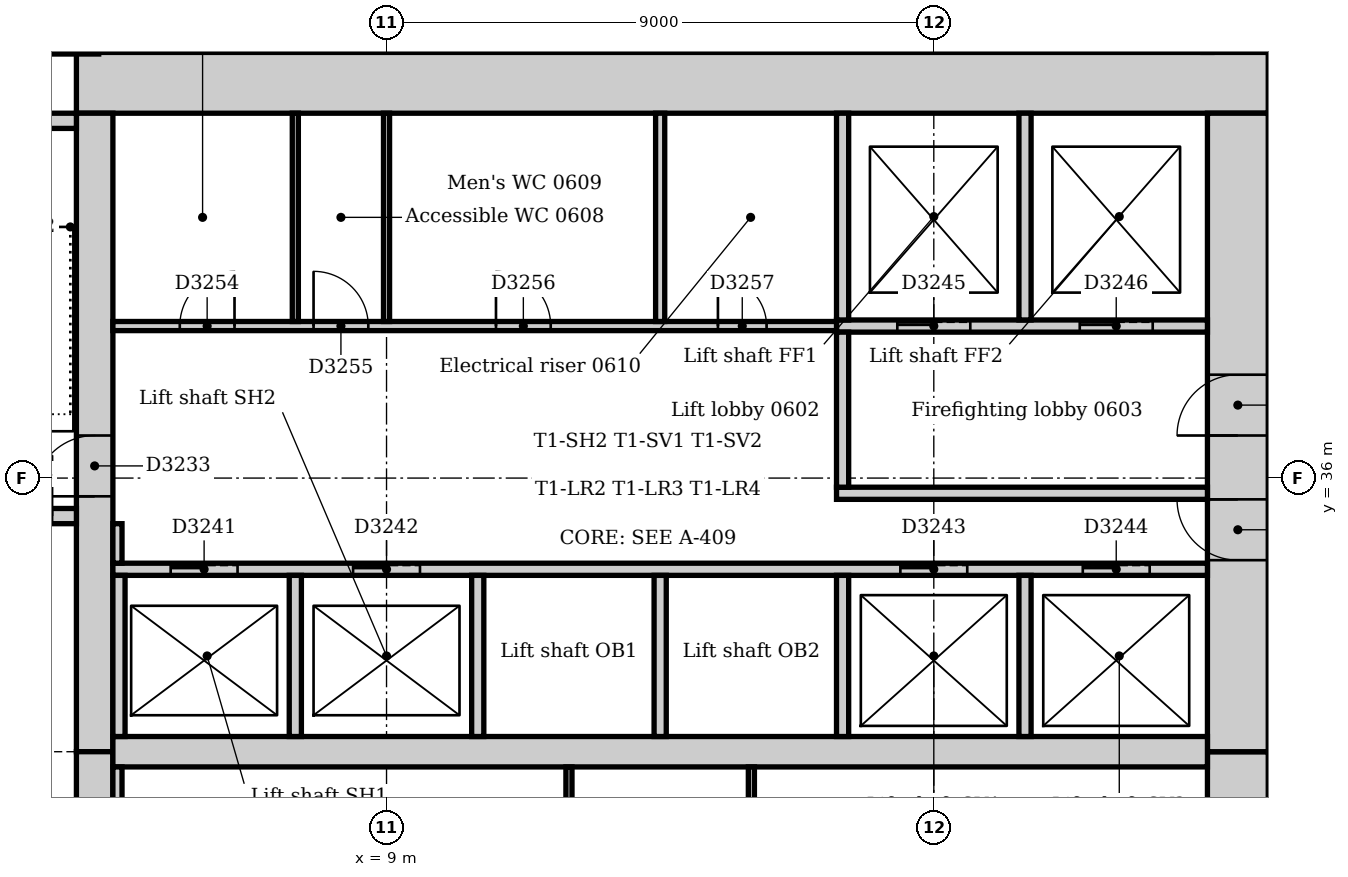
"""IFC4 building model, lengths in metres.
Left out: names, types, materials, properties, quantities, classifications, styles, units other than length and angle.
Written with IfcOpenShell. Run it as: python <this file> out.ifc"""

import sys

from ifc_helpers import new_model, si_unit, direction, frame, frame_2d, origin, origin_2d, place, context, subcontext, project, spatial, rectangle, extrude, element, fill, save


model = new_model("IFC4")
c1 = context("Model", 3, precision=1e-05, world=origin(), true_north=direction((0.0, 1.0)))
c2 = subcontext(c1, "Body", "Model", "MODEL_VIEW")
j1 = project(units=[si_unit("LENGTHUNIT", "METRE"), si_unit("PLANEANGLEUNIT", "RADIAN")], contexts=[c1])
p1 = place(None, origin())
s1 = spatial("IfcSite", under=j1, at=p1, CompositionType="ELEMENT")
p2 = place(p1, origin())
s2 = spatial("IfcBuilding", under=s1, at=p2, CompositionType="ELEMENT")
p3 = place(p2, frame((0.0, 0.0, 30.0)))
s3 = spatial("IfcBuildingStorey", under=s2, at=p3, CompositionType="ELEMENT", Elevation=30.0)
p4 = place(p3, frame((23.5, 42.5, 0.0), z_axis=(0.0, 0.0, 1.0), x_axis=(-1.0, 0.0, 0.0)))
e1 = element("IfcWall", 1, at=p4, inside=s3, PredefinedType="SOLIDWALL", context=c2, shape_type="SweptSolid", body=[
    extrude(rectangle(XDim=19.6, YDim=1.0, at=frame_2d((9.8, 0.0))), origin(), (0.0, 0.0, 1.0), 4.0),
])
p5 = place(p3, frame((23.0, 21.0, 0.0), z_axis=(0.0, 0.0, 1.0), x_axis=(0.0, 1.0, 0.0)))
e2 = element("IfcWall", 2, at=p5, inside=s3, PredefinedType="SOLIDWALL", context=c2, shape_type="SweptSolid", body=[
    extrude(rectangle(XDim=10.5, YDim=1.0, at=frame_2d((5.25, 0.0))), origin(), (0.0, 0.0, 1.0), 4.0),
])
p6 = place(p5, frame((4.35, 0.0, 0.0)))
e3 = element("IfcOpeningElement", 3, at=p6, cuts=e2, PredefinedType="OPENING", context=c2, shape_type="SweptSolid", body=[
    extrude(rectangle(XDim=1.8, YDim=2.1, at=frame_2d((0.9, 1.05))), frame((0.0, 0.51, 0.0), z_axis=(0.0, -1.0, 0.0), x_axis=(1.0, 0.0, 0.0)), (0.0, 0.0, 1.0), 1.02),
])
p7 = place(p3, frame((23.0, 31.5, 0.0), z_axis=(0.0, 0.0, 1.0), x_axis=(0.0, 1.0, 0.0)))
e4 = element("IfcWall", 4, at=p7, inside=s3, PredefinedType="SOLIDWALL", context=c2, shape_type="SweptSolid", body=[
    extrude(rectangle(XDim=10.5, YDim=1.0, at=frame_2d((5.25, 0.0))), origin(), (0.0, 0.0, 1.0), 4.0),
])
p8 = place(p7, frame((3.15, 0.0, 0.0)))
e5 = element("IfcOpeningElement", 5, at=p8, cuts=e4, PredefinedType="OPENING", context=c2, shape_type="SweptSolid", body=[
    extrude(rectangle(XDim=1.0, YDim=2.1, at=frame_2d((0.5, 1.05))), frame((0.0, 0.51, 0.0), z_axis=(0.0, -1.0, 0.0), x_axis=(1.0, 0.0, 0.0)), (0.0, 0.0, 1.0), 1.02),
])
p9 = place(p7, frame((5.2, 0.0, 0.0)))
e6 = element("IfcOpeningElement", 6, at=p9, cuts=e4, PredefinedType="OPENING", context=c2, shape_type="SweptSolid", body=[
    extrude(rectangle(XDim=1.0, YDim=2.1, at=frame_2d((0.5, 1.05))), frame((0.0, 0.51, 0.0), z_axis=(0.0, -1.0, 0.0), x_axis=(1.0, 0.0, 0.0)), (0.0, 0.0, 1.0), 1.02),
])
p10 = place(p3, frame((4.2, 42.0, 0.0), z_axis=(0.0, 0.0, 1.0), x_axis=(0.0, -1.0, 0.0)))
e7 = element("IfcWall", 7, at=p10, inside=s3, PredefinedType="SOLIDWALL", context=c2, shape_type="SweptSolid", body=[
    extrude(rectangle(XDim=10.5, YDim=0.6, at=frame_2d((5.25, 0.0))), origin(), (0.0, 0.0, 1.0), 4.0),
])
p11 = place(p10, frame((5.3, 0.0, 0.0)))
e8 = element("IfcOpeningElement", 8, at=p11, cuts=e7, PredefinedType="OPENING", context=c2, shape_type="SweptSolid", body=[
    extrude(rectangle(XDim=1.0, YDim=2.1, at=frame_2d((0.5, 1.05))), frame((0.0, 0.31, 0.0), z_axis=(0.0, -1.0, 0.0), x_axis=(1.0, 0.0, 0.0)), (0.0, 0.0, 1.0), 0.62),
])
p12 = place(p3, frame((4.2, 31.5, 0.0), z_axis=(0.0, 0.0, 1.0), x_axis=(0.0, -1.0, 0.0)))
e9 = element("IfcWall", 9, at=p12, inside=s3, PredefinedType="SOLIDWALL", context=c2, shape_type="SweptSolid", body=[
    extrude(rectangle(XDim=10.5, YDim=0.6, at=frame_2d((5.25, 0.0))), origin(), (0.0, 0.0, 1.0), 4.0),
])
p13 = place(p12, frame((4.25, 0.0, 0.0)))
e10 = element("IfcOpeningElement", 10, at=p13, cuts=e9, PredefinedType="OPENING", context=c2, shape_type="SweptSolid", body=[
    extrude(rectangle(XDim=1.0, YDim=2.1, at=frame_2d((0.5, 1.05))), frame((0.0, 0.31, 0.0), z_axis=(0.0, -1.0, 0.0), x_axis=(1.0, 0.0, 0.0)), (0.0, 0.0, 1.0), 0.62),
])
p14 = place(p3, frame((4.5, 31.5, 0.0), z_axis=(0.0, 0.0, 1.0), x_axis=(1.0, 0.0, 0.0)))
e11 = element("IfcWall", 11, at=p14, inside=s3, PredefinedType="SOLIDWALL", context=c2, shape_type="SweptSolid", body=[
    extrude(rectangle(XDim=18.0, YDim=0.5, at=frame_2d((9.0, 0.0))), origin(), (0.0, 0.0, 1.0), 4.0),
])
p15 = place(p3, frame((0.36, 35.375, 0.0), z_axis=(0.0, 0.0, 1.0), x_axis=(1.0, 0.0, 0.0)))
e12 = element("IfcWall", 12, at=p15, inside=s3, PredefinedType="SOLIDWALL", context=c2, shape_type="SweptSolid", body=[
    extrude(rectangle(XDim=3.54, YDim=0.25, at=frame_2d((1.77, 0.0))), origin(), (0.0, 0.0, 1.0), 4.0),
])
p16 = place(p15, frame((2.14, 0.0, 0.0)))
e13 = element("IfcOpeningElement", 13, at=p16, cuts=e12, PredefinedType="OPENING", context=c2, shape_type="SweptSolid", body=[
    extrude(rectangle(XDim=1.0, YDim=2.1, at=frame_2d((0.5, 1.05))), frame((0.0, 0.135, 0.0), z_axis=(0.0, -1.0, 0.0), x_axis=(1.0, 0.0, 0.0)), (0.0, 0.0, 1.0), 0.27),
])
p17 = place(p3, frame((3.9, 41.875, 0.0), z_axis=(0.0, 0.0, 1.0), x_axis=(-1.0, 0.0, 0.0)))
e14 = element("IfcWall", 14, at=p17, inside=s3, PredefinedType="SOLIDWALL", context=c2, shape_type="SweptSolid", body=[
    extrude(rectangle(XDim=3.54, YDim=0.25, at=frame_2d((1.77, 0.0))), origin(), (0.0, 0.0, 1.0), 4.0),
])
p18 = place(p3, frame((3.667, 43.574, 0.0), z_axis=(0.0, 0.0, 1.0), x_axis=(1.0, 0.0, 0.0)))
e15 = element("IfcColumn", 15, at=p18, inside=s3, PredefinedType="COLUMN", context=c2, shape_type="SweptSolid", body=[
    extrude(rectangle(XDim=1.2, YDim=1.2, at=origin_2d()), origin(), (0.0, 0.0, 1.0), 3.85),
])
p19 = place(p3, frame((16.4, 35.75, 0.0), z_axis=(0.0, 0.0, 1.0), x_axis=(1.0, 0.0, 0.0)))
e16 = element("IfcWall", 16, at=p19, inside=s3, PredefinedType="PARTITIONING", context=c2, shape_type="SweptSolid", body=[
    extrude(rectangle(XDim=6.1, YDim=0.2, at=frame_2d((3.05, 0.0))), origin(), (0.0, 0.0, 1.0), 3.85),
])
p20 = place(p3, frame((16.4, 38.5, 0.0), z_axis=(0.0, 0.0, 1.0), x_axis=(1.0, 0.0, 0.0)))
e17 = element("IfcWall", 17, at=p20, inside=s3, PredefinedType="PARTITIONING", context=c2, shape_type="SweptSolid", body=[
    extrude(rectangle(XDim=6.1, YDim=0.2, at=frame_2d((3.05, 0.0))), origin(), (0.0, 0.0, 1.0), 3.85),
])
p21 = place(p20, frame((1.0, 0.0, 0.0)))
e18 = element("IfcOpeningElement", 18, at=p21, cuts=e17, PredefinedType="OPENING", context=c2, shape_type="SweptSolid", body=[
    extrude(rectangle(XDim=1.2, YDim=2.1, at=frame_2d((0.6, 1.05))), frame((0.0, 0.11, 0.0), z_axis=(0.0, -1.0, 0.0), x_axis=(1.0, 0.0, 0.0)), (0.0, 0.0, 1.0), 0.22),
])
p22 = place(p20, frame((4.0, 0.0, 0.0)))
e19 = element("IfcOpeningElement", 19, at=p22, cuts=e17, PredefinedType="OPENING", context=c2, shape_type="SweptSolid", body=[
    extrude(rectangle(XDim=1.2, YDim=2.1, at=frame_2d((0.6, 1.05))), frame((0.0, 0.11, 0.0), z_axis=(0.0, -1.0, 0.0), x_axis=(1.0, 0.0, 0.0)), (0.0, 0.0, 1.0), 0.22),
])
p23 = place(p3, frame((16.5, 35.85, 0.0), z_axis=(0.0, 0.0, 1.0), x_axis=(0.0, 1.0, 0.0)))
e20 = element("IfcWall", 20, at=p23, inside=s3, PredefinedType="PARTITIONING", context=c2, shape_type="SweptSolid", body=[
    extrude(rectangle(XDim=2.55, YDim=0.2, at=frame_2d((1.275, 0.0))), origin(), (0.0, 0.0, 1.0), 3.85),
])
p24 = place(p3, frame((4.5, 34.5, 0.0), z_axis=(0.0, 0.0, 1.0), x_axis=(1.0, 0.0, 0.0)))
e21 = element("IfcWall", 21, at=p24, inside=s3, PredefinedType="PARTITIONING", context=c2, shape_type="SweptSolid", body=[
    extrude(rectangle(XDim=18.0, YDim=0.2, at=frame_2d((9.0, 0.0))), origin(), (0.0, 0.0, 1.0), 3.85),
])
p25 = place(p24, frame((0.95, 0.0, 0.0)))
e22 = element("IfcOpeningElement", 22, at=p25, cuts=e21, PredefinedType="OPENING", context=c2, shape_type="SweptSolid", body=[
    extrude(rectangle(XDim=1.1, YDim=2.1, at=frame_2d((0.55, 1.05))), frame((0.0, 0.11, 0.0), z_axis=(0.0, -1.0, 0.0), x_axis=(1.0, 0.0, 0.0)), (0.0, 0.0, 1.0), 0.22),
])
p26 = place(p24, frame((3.95, 0.0, 0.0)))
e23 = element("IfcOpeningElement", 23, at=p26, cuts=e21, PredefinedType="OPENING", context=c2, shape_type="SweptSolid", body=[
    extrude(rectangle(XDim=1.1, YDim=2.1, at=frame_2d((0.55, 1.05))), frame((0.0, 0.11, 0.0), z_axis=(0.0, -1.0, 0.0), x_axis=(1.0, 0.0, 0.0)), (0.0, 0.0, 1.0), 0.22),
])
p27 = place(p24, frame((12.95, 0.0, 0.0)))
e24 = element("IfcOpeningElement", 24, at=p27, cuts=e21, PredefinedType="OPENING", context=c2, shape_type="SweptSolid", body=[
    extrude(rectangle(XDim=1.1, YDim=2.1, at=frame_2d((0.55, 1.05))), frame((0.0, 0.11, 0.0), z_axis=(0.0, -1.0, 0.0), x_axis=(1.0, 0.0, 0.0)), (0.0, 0.0, 1.0), 0.22),
])
p28 = place(p24, frame((15.95, 0.0, 0.0)))
e25 = element("IfcOpeningElement", 25, at=p28, cuts=e21, PredefinedType="OPENING", context=c2, shape_type="SweptSolid", body=[
    extrude(rectangle(XDim=1.1, YDim=2.1, at=frame_2d((0.55, 1.05))), frame((0.0, 0.11, 0.0), z_axis=(0.0, -1.0, 0.0), x_axis=(1.0, 0.0, 0.0)), (0.0, 0.0, 1.0), 0.22),
])
for number, where, z_axis, x_axis in (
    (26, (16.5, 38.6, 0.0), (0.0, 0.0, 1.0), (0.0, 1.0, 0.0)),
    (27, (19.5, 38.6, 0.0), (0.0, 0.0, 1.0), (0.0, 1.0, 0.0)),
):
    element("IfcWall", number, at=place(p3, frame(where, z_axis=z_axis, x_axis=x_axis)), inside=s3, PredefinedType="PARTITIONING", context=c2, shape_type="SweptSolid", body=[
        extrude(rectangle(XDim=3.4, YDim=0.2, at=frame_2d((1.7, 0.0))), origin(), (0.0, 0.0, 1.0), 3.85),
    ])
for number, where, z_axis, x_axis in (
    (28, (4.6, 31.75, 0.0), (0.0, 0.0, 1.0), (0.0, 1.0, 0.0)),
    (29, (7.5, 31.75, 0.0), (0.0, 0.0, 1.0), (0.0, 1.0, 0.0)),
    (30, (10.5, 31.75, 0.0), (0.0, 0.0, 1.0), (0.0, 1.0, 0.0)),
    (31, (13.5, 31.75, 0.0), (0.0, 0.0, 1.0), (0.0, 1.0, 0.0)),
    (32, (16.5, 31.75, 0.0), (0.0, 0.0, 1.0), (0.0, 1.0, 0.0)),
    (33, (19.5, 31.75, 0.0), (0.0, 0.0, 1.0), (0.0, 1.0, 0.0)),
):
    element("IfcWall", number, at=place(p3, frame(where, z_axis=z_axis, x_axis=x_axis)), inside=s3, PredefinedType="PARTITIONING", context=c2, shape_type="SweptSolid", body=[
        extrude(rectangle(XDim=2.65, YDim=0.2, at=frame_2d((1.325, 0.0))), origin(), (0.0, 0.0, 1.0), 3.85),
    ])
p29 = place(p3, frame((4.5, 38.5, 0.0), z_axis=(0.0, 0.0, 1.0), x_axis=(1.0, 0.0, 0.0)))
e34 = element("IfcWall", 34, at=p29, inside=s3, PredefinedType="PARTITIONING", context=c2, shape_type="SweptSolid", body=[
    extrude(rectangle(XDim=11.9, YDim=0.15, at=frame_2d((5.95, 0.0))), origin(), (0.0, 0.0, 1.0), 3.85),
])
p30 = place(p29, frame((1.1, 0.0, 0.0)))
e35 = element("IfcOpeningElement", 35, at=p30, cuts=e34, PredefinedType="OPENING", context=c2, shape_type="SweptSolid", body=[
    extrude(rectangle(XDim=0.9, YDim=2.1, at=frame_2d((0.45, 1.05))), frame((0.0, 0.085, 0.0), z_axis=(0.0, -1.0, 0.0), x_axis=(1.0, 0.0, 0.0)), (0.0, 0.0, 1.0), 0.17),
])
p31 = place(p29, frame((3.3, 0.0, 0.0)))
e36 = element("IfcOpeningElement", 36, at=p31, cuts=e34, PredefinedType="OPENING", context=c2, shape_type="SweptSolid", body=[
    extrude(rectangle(XDim=0.9, YDim=2.1, at=frame_2d((0.45, 1.05))), frame((0.0, 0.085, 0.0), z_axis=(0.0, -1.0, 0.0), x_axis=(1.0, 0.0, 0.0)), (0.0, 0.0, 1.0), 0.17),
])
p32 = place(p29, frame((6.3, 0.0, 0.0)))
e37 = element("IfcOpeningElement", 37, at=p32, cuts=e34, PredefinedType="OPENING", context=c2, shape_type="SweptSolid", body=[
    extrude(rectangle(XDim=0.9, YDim=2.1, at=frame_2d((0.45, 1.05))), frame((0.0, 0.085, 0.0), z_axis=(0.0, -1.0, 0.0), x_axis=(1.0, 0.0, 0.0)), (0.0, 0.0, 1.0), 0.17),
])
p33 = place(p29, frame((9.95, 0.0, 0.0)))
e38 = element("IfcOpeningElement", 38, at=p33, cuts=e34, PredefinedType="OPENING", context=c2, shape_type="SweptSolid", body=[
    extrude(rectangle(XDim=0.8, YDim=2.1, at=frame_2d((0.4, 1.05))), frame((0.0, 0.085, 0.0), z_axis=(0.0, -1.0, 0.0), x_axis=(1.0, 0.0, 0.0)), (0.0, 0.0, 1.0), 0.17),
])
p34 = place(p3, frame((4.575, 28.575, 0.0), z_axis=(0.0, 0.0, 1.0), x_axis=(0.0, 1.0, 0.0)))
e39 = element("IfcWall", 39, at=p34, inside=s3, PredefinedType="PARTITIONING", context=c2, shape_type="SweptSolid", body=[
    extrude(rectangle(XDim=2.675, YDim=0.15, at=frame_2d((1.337, 0.0))), origin(), (0.0, 0.0, 1.0), 3.85),
])
p35 = place(p3, frame((4.575, 34.6, 0.0), z_axis=(0.0, 0.0, 1.0), x_axis=(0.0, 1.0, 0.0)))
e40 = element("IfcWall", 40, at=p35, inside=s3, PredefinedType="PARTITIONING", context=c2, shape_type="SweptSolid", body=[
    extrude(rectangle(XDim=0.65, YDim=0.15, at=frame_2d((0.325, 0.0))), origin(), (0.0, 0.0, 1.0), 3.85),
])
p36 = place(p3, frame((13.5, 38.575, 0.0), z_axis=(0.0, 0.0, 1.0), x_axis=(0.0, 1.0, 0.0)))
e41 = element("IfcWall", 41, at=p36, inside=s3, PredefinedType="PARTITIONING", context=c2, shape_type="SweptSolid", body=[
    extrude(rectangle(XDim=3.425, YDim=0.15, at=frame_2d((1.712, 0.0))), origin(), (0.0, 0.0, 1.0), 3.85),
])
for number, where, z_axis, x_axis in (
    (42, (7.5, 38.575, 0.0), (0.0, 0.0, 1.0), (0.0, 1.0, 0.0)),
    (43, (9.0, 38.575, 0.0), (0.0, 0.0, 1.0), (0.0, 1.0, 0.0)),
):
    element("IfcWall", number, at=place(p3, frame(where, z_axis=z_axis, x_axis=x_axis)), inside=s3, PredefinedType="PARTITIONING", context=c2, shape_type="SweptSolid", body=[
        extrude(rectangle(XDim=3.425, YDim=0.1, at=frame_2d((1.712, 0.0))), origin(), (0.0, 0.0, 1.0), 3.85),
    ])
for number, where, z_axis, x_axis in (
    (44, (12.0, 28.575, 0.0), (0.0, 0.0, 1.0), (0.0, 1.0, 0.0)),
    (45, (15.0, 28.575, 0.0), (0.0, 0.0, 1.0), (0.0, 1.0, 0.0)),
):
    element("IfcWall", number, at=place(p3, frame(where, z_axis=z_axis, x_axis=x_axis)), inside=s3, PredefinedType="PARTITIONING", context=c2, shape_type="SweptSolid", body=[
        extrude(rectangle(XDim=2.675, YDim=0.1, at=frame_2d((1.337, 0.0))), origin(), (0.0, 0.0, 1.0), 3.85),
    ])
p37 = place(p11, frame((1.0, 0.0, 0.0), z_axis=(0.0, 0.0, 1.0), x_axis=(-1.0, 0.0, 0.0)))
e46 = element("IfcDoor", 46, at=p37, inside=s3, OperationType="SINGLE_SWING_LEFT", PredefinedType="DOOR", context=c2, shape_type="SweptSolid", body=[
    extrude(rectangle(XDim=1.0, YDim=2.1, at=frame_2d((0.5, 1.05))), frame((0.0, 0.025, 0.0), z_axis=(0.0, -1.0, 0.0), x_axis=(1.0, 0.0, 0.0)), (0.0, 0.0, 1.0), 0.05),
])
fill(e8, e46)
p38 = place(p25, origin())
e47 = element("IfcDoor", 47, at=p38, inside=s3, OperationType="SLIDING_TO_LEFT", PredefinedType="DOOR", context=c2, shape_type="SweptSolid", body=[
    extrude(rectangle(XDim=1.1, YDim=2.1, at=frame_2d((0.55, 1.05))), frame((0.0, 0.025, 0.0), z_axis=(0.0, -1.0, 0.0), x_axis=(1.0, 0.0, 0.0)), (0.0, 0.0, 1.0), 0.05),
])
fill(e22, e47)
p39 = place(p26, origin())
e48 = element("IfcDoor", 48, at=p39, inside=s3, OperationType="SLIDING_TO_LEFT", PredefinedType="DOOR", context=c2, shape_type="SweptSolid", body=[
    extrude(rectangle(XDim=1.1, YDim=2.1, at=frame_2d((0.55, 1.05))), frame((0.0, 0.025, 0.0), z_axis=(0.0, -1.0, 0.0), x_axis=(1.0, 0.0, 0.0)), (0.0, 0.0, 1.0), 0.05),
])
fill(e23, e48)
p40 = place(p27, origin())
e49 = element("IfcDoor", 49, at=p40, inside=s3, OperationType="SLIDING_TO_LEFT", PredefinedType="DOOR", context=c2, shape_type="SweptSolid", body=[
    extrude(rectangle(XDim=1.1, YDim=2.1, at=frame_2d((0.55, 1.05))), frame((0.0, 0.025, 0.0), z_axis=(0.0, -1.0, 0.0), x_axis=(1.0, 0.0, 0.0)), (0.0, 0.0, 1.0), 0.05),
])
fill(e24, e49)
p41 = place(p28, origin())
e50 = element("IfcDoor", 50, at=p41, inside=s3, OperationType="SLIDING_TO_LEFT", PredefinedType="DOOR", context=c2, shape_type="SweptSolid", body=[
    extrude(rectangle(XDim=1.1, YDim=2.1, at=frame_2d((0.55, 1.05))), frame((0.0, 0.025, 0.0), z_axis=(0.0, -1.0, 0.0), x_axis=(1.0, 0.0, 0.0)), (0.0, 0.0, 1.0), 0.05),
])
fill(e25, e50)
p42 = place(p21, origin())
e51 = element("IfcDoor", 51, at=p42, inside=s3, OperationType="SLIDING_TO_LEFT", PredefinedType="DOOR", context=c2, shape_type="SweptSolid", body=[
    extrude(rectangle(XDim=1.2, YDim=2.1, at=frame_2d((0.6, 1.05))), frame((0.0, 0.025, 0.0), z_axis=(0.0, -1.0, 0.0), x_axis=(1.0, 0.0, 0.0)), (0.0, 0.0, 1.0), 0.05),
])
fill(e18, e51)
p43 = place(p22, origin())
e52 = element("IfcDoor", 52, at=p43, inside=s3, OperationType="SLIDING_TO_LEFT", PredefinedType="DOOR", context=c2, shape_type="SweptSolid", body=[
    extrude(rectangle(XDim=1.2, YDim=2.1, at=frame_2d((0.6, 1.05))), frame((0.0, 0.025, 0.0), z_axis=(0.0, -1.0, 0.0), x_axis=(1.0, 0.0, 0.0)), (0.0, 0.0, 1.0), 0.05),
])
fill(e19, e52)
p44 = place(p8, origin())
e53 = element("IfcDoor", 53, at=p44, inside=s3, OperationType="SINGLE_SWING_RIGHT", PredefinedType="DOOR", context=c2, shape_type="SweptSolid", body=[
    extrude(rectangle(XDim=1.0, YDim=2.1, at=frame_2d((0.5, 1.05))), frame((0.0, 0.025, 0.0), z_axis=(0.0, -1.0, 0.0), x_axis=(1.0, 0.0, 0.0)), (0.0, 0.0, 1.0), 0.05),
])
fill(e5, e53)
p45 = place(p9, origin())
e54 = element("IfcDoor", 54, at=p45, inside=s3, OperationType="SINGLE_SWING_LEFT", PredefinedType="DOOR", context=c2, shape_type="SweptSolid", body=[
    extrude(rectangle(XDim=1.0, YDim=2.1, at=frame_2d((0.5, 1.05))), frame((0.0, 0.025, 0.0), z_axis=(0.0, -1.0, 0.0), x_axis=(1.0, 0.0, 0.0)), (0.0, 0.0, 1.0), 0.05),
])
fill(e6, e54)
p46 = place(p30, origin())
e55 = element("IfcDoor", 55, at=p46, inside=s3, OperationType="SINGLE_SWING_RIGHT", PredefinedType="DOOR", context=c2, shape_type="SweptSolid", body=[
    extrude(rectangle(XDim=0.9, YDim=2.1, at=frame_2d((0.45, 1.05))), frame((0.0, 0.025, 0.0), z_axis=(0.0, -1.0, 0.0), x_axis=(1.0, 0.0, 0.0)), (0.0, 0.0, 1.0), 0.05),
])
fill(e35, e55)
p47 = place(p31, origin())
e56 = element("IfcDoor", 56, at=p47, inside=s3, OperationType="SINGLE_SWING_LEFT", PredefinedType="DOOR", context=c2, shape_type="SweptSolid", body=[
    extrude(rectangle(XDim=0.9, YDim=2.1, at=frame_2d((0.45, 1.05))), frame((0.0, 0.025, 0.0), z_axis=(0.0, -1.0, 0.0), x_axis=(1.0, 0.0, 0.0)), (0.0, 0.0, 1.0), 0.05),
])
fill(e36, e56)
p48 = place(p32, origin())
e57 = element("IfcDoor", 57, at=p48, inside=s3, OperationType="SINGLE_SWING_LEFT", PredefinedType="DOOR", context=c2, shape_type="SweptSolid", body=[
    extrude(rectangle(XDim=0.9, YDim=2.1, at=frame_2d((0.45, 1.05))), frame((0.0, 0.025, 0.0), z_axis=(0.0, -1.0, 0.0), x_axis=(1.0, 0.0, 0.0)), (0.0, 0.0, 1.0), 0.05),
])
fill(e37, e57)
p49 = place(p33, origin())
e58 = element("IfcDoor", 58, at=p49, inside=s3, OperationType="SINGLE_SWING_LEFT", PredefinedType="DOOR", context=c2, shape_type="SweptSolid", body=[
    extrude(rectangle(XDim=0.8, YDim=2.1, at=frame_2d((0.4, 1.05))), frame((0.0, 0.025, 0.0), z_axis=(0.0, -1.0, 0.0), x_axis=(1.0, 0.0, 0.0)), (0.0, 0.0, 1.0), 0.05),
])
fill(e38, e58)
save(model, sys.argv[1])
